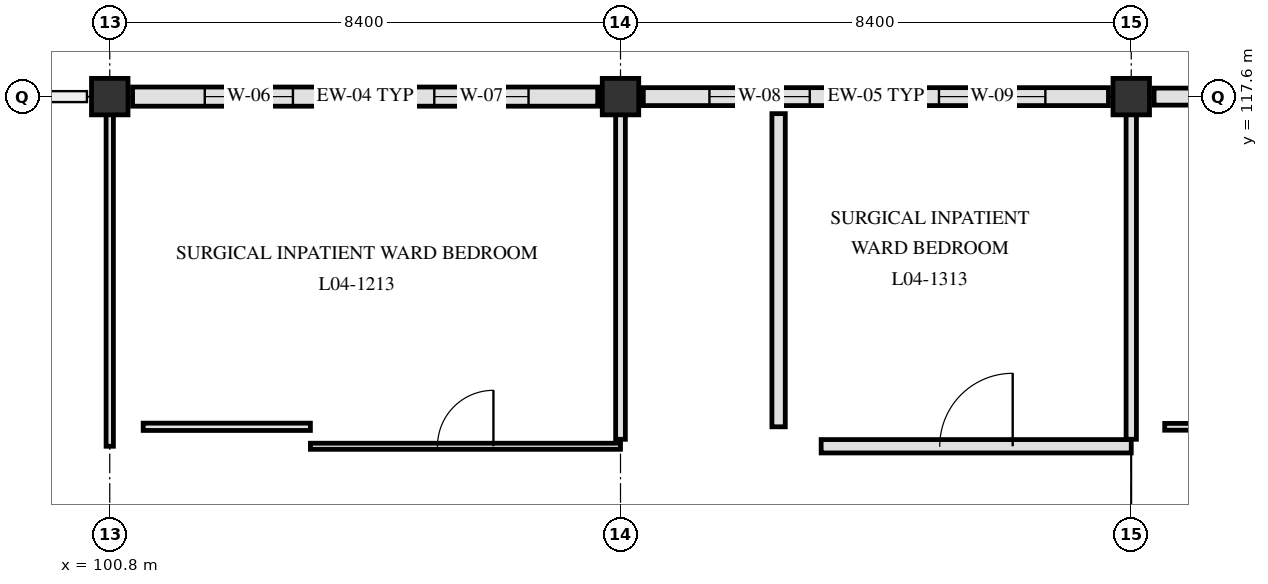
"""IFC4 building model, lengths in metres.
Left out: names, types, materials, properties, quantities, classifications, styles, units other than length and angle.
Written with IfcOpenShell. Run it as: python <this file> out.ifc"""

import sys

from ifc_helpers import new_model, si_unit, direction, frame, frame_2d, origin, origin_2d, place, context, subcontext, project, spatial, rectangle, extrude, element, fill, save


model = new_model("IFC4")
c1 = context("Model", 3, precision=1e-05, world=origin(), true_north=direction((0.0, 1.0)))
c2 = subcontext(c1, "Body", "Model", "MODEL_VIEW")
j1 = project(units=[si_unit("LENGTHUNIT", "METRE"), si_unit("PLANEANGLEUNIT", "RADIAN")], contexts=[c1])
p1 = place(None, origin())
s1 = spatial("IfcSite", under=j1, at=p1, CompositionType="ELEMENT")
p2 = place(p1, origin())
s2 = spatial("IfcBuilding", under=s1, at=p2, CompositionType="ELEMENT")
p3 = place(p2, frame((0.0, 0.0, 18.6)))
s3 = spatial("IfcBuildingStorey", under=s2, at=p3, CompositionType="ELEMENT", Elevation=18.6)
for number, where, z_axis, x_axis in (
    (1, (100.8, 117.6, 0.0), (0.0, 0.0, 1.0), (1.0, 0.0, 0.0)),
    (2, (109.2, 117.6, 0.0), (0.0, 0.0, 1.0), (1.0, 0.0, 0.0)),
    (3, (117.6, 117.6, 0.0), (0.0, 0.0, 1.0), (1.0, 0.0, 0.0)),
):
    element("IfcColumn", number, at=place(p3, frame(where, z_axis=z_axis, x_axis=x_axis)), inside=s3, PredefinedType="COLUMN", context=c2, shape_type="SweptSolid", body=[
        extrude(rectangle(XDim=0.6, YDim=0.6, at=origin_2d()), origin(), (0.0, 0.0, 1.0), 3.9),
    ])
p4 = place(p3, frame((101.175, 117.6, 0.0), z_axis=(0.0, 0.0, 1.0), x_axis=(1.0, 0.0, 0.0)))
e4 = element("IfcWall", 4, at=p4, inside=s3, PredefinedType="SOLIDWALL", context=c2, shape_type="SweptSolid", body=[
    extrude(rectangle(XDim=7.65, YDim=0.315, at=frame_2d((3.825, 0.0))), origin(), (0.0, 0.0, 1.0), 3.31),
])
p5 = place(p4, frame((1.188, 0.0, 0.85)))
e5 = element("IfcOpeningElement", 5, at=p5, cuts=e4, PredefinedType="OPENING", context=c2, shape_type="SweptSolid", body=[
    extrude(rectangle(XDim=1.45, YDim=1.3, at=frame_2d((0.725, 0.65))), frame((0.0, 0.167, 0.0), z_axis=(0.0, -1.0, 0.0), x_axis=(1.0, 0.0, 0.0)), (0.0, 0.0, 1.0), 0.335),
])
p6 = place(p4, frame((4.962, 0.0, 0.85)))
e6 = element("IfcOpeningElement", 6, at=p6, cuts=e4, PredefinedType="OPENING", context=c2, shape_type="SweptSolid", body=[
    extrude(rectangle(XDim=1.55, YDim=1.3, at=frame_2d((0.775, 0.65))), frame((0.0, 0.167, 0.0), z_axis=(0.0, -1.0, 0.0), x_axis=(1.0, 0.0, 0.0)), (0.0, 0.0, 1.0), 0.335),
])
p7 = place(p3, frame((109.575, 117.6, 0.0), z_axis=(0.0, 0.0, 1.0), x_axis=(1.0, 0.0, 0.0)))
e7 = element("IfcWall", 7, at=p7, inside=s3, PredefinedType="SOLIDWALL", context=c2, shape_type="SweptSolid", body=[
    extrude(rectangle(XDim=7.65, YDim=0.295, at=frame_2d((3.825, 0.0))), origin(), (0.0, 0.0, 1.0), 3.31),
])
p8 = place(p7, frame((1.087, 0.0, 0.85)))
e8 = element("IfcOpeningElement", 8, at=p8, cuts=e7, PredefinedType="OPENING", context=c2, shape_type="SweptSolid", body=[
    extrude(rectangle(XDim=1.65, YDim=1.3, at=frame_2d((0.825, 0.65))), frame((0.0, 0.157, 0.0), z_axis=(0.0, -1.0, 0.0), x_axis=(1.0, 0.0, 0.0)), (0.0, 0.0, 1.0), 0.315),
])
p9 = place(p7, frame((4.863, 0.0, 0.85)))
e9 = element("IfcOpeningElement", 9, at=p9, cuts=e7, PredefinedType="OPENING", context=c2, shape_type="SweptSolid", body=[
    extrude(rectangle(XDim=1.75, YDim=1.3, at=frame_2d((0.875, 0.65))), frame((0.0, 0.157, 0.0), z_axis=(0.0, -1.0, 0.0), x_axis=(1.0, 0.0, 0.0)), (0.0, 0.0, 1.0), 0.315),
])
p10 = place(p3, frame((117.975, 117.6, 0.0), z_axis=(0.0, 0.0, 1.0), x_axis=(1.0, 0.0, 0.0)))
e10 = element("IfcWall", 10, at=p10, inside=s3, PredefinedType="SOLIDWALL", context=c2, shape_type="SweptSolid", body=[
    extrude(rectangle(XDim=7.65, YDim=0.28, at=frame_2d((3.825, 0.0))), origin(), (0.0, 0.0, 1.0), 3.31),
])
p11 = place(p10, frame((0.988, 0.0, 0.85)))
e11 = element("IfcOpeningElement", 11, at=p11, cuts=e10, PredefinedType="OPENING", context=c2, shape_type="SweptSolid", body=[
    extrude(rectangle(XDim=1.85, YDim=1.3, at=frame_2d((0.925, 0.65))), frame((0.0, 0.15, 0.0), z_axis=(0.0, -1.0, 0.0), x_axis=(1.0, 0.0, 0.0)), (0.0, 0.0, 1.0), 0.3),
])
p12 = place(p10, frame((5.238, 0.0, 0.85)))
e12 = element("IfcOpeningElement", 12, at=p12, cuts=e10, PredefinedType="OPENING", context=c2, shape_type="SweptSolid", body=[
    extrude(rectangle(XDim=1.0, YDim=1.42, at=frame_2d((0.5, 0.71))), frame((0.0, 0.15, 0.0), z_axis=(0.0, -1.0, 0.0), x_axis=(1.0, 0.0, 0.0)), (0.0, 0.0, 1.0), 0.3),
])
p13 = place(p3, frame((104.1, 111.85, 0.0), z_axis=(0.0, 0.0, 1.0), x_axis=(1.0, 0.0, 0.0)))
e13 = element("IfcWall", 13, at=p13, inside=s3, PredefinedType="PARTITIONING", context=c2, shape_type="SweptSolid", body=[
    extrude(rectangle(XDim=5.1, YDim=0.1, at=frame_2d((2.55, 0.0))), origin(), (0.0, 0.0, 1.0), 3.26),
])
p14 = place(p13, frame((2.09, 0.0, 0.0)))
e14 = element("IfcOpeningElement", 14, at=p14, cuts=e13, PredefinedType="OPENING", context=c2, shape_type="SweptSolid", body=[
    extrude(rectangle(XDim=0.92, YDim=2.08, at=frame_2d((0.46, 1.04))), frame((0.0, 0.06, 0.0), z_axis=(0.0, -1.0, 0.0), x_axis=(1.0, 0.0, 0.0)), (0.0, 0.0, 1.0), 0.12),
])
p15 = place(p3, frame((112.5, 111.85, 0.0), z_axis=(0.0, 0.0, 1.0), x_axis=(1.0, 0.0, 0.0)))
e15 = element("IfcWall", 15, at=p15, inside=s3, PredefinedType="PARTITIONING", context=c2, shape_type="SweptSolid", body=[
    extrude(rectangle(XDim=5.1, YDim=0.22, at=frame_2d((2.55, 0.0))), origin(), (0.0, 0.0, 1.0), 3.26),
])
p16 = place(p15, frame((1.95, 0.0, 0.0)))
e16 = element("IfcOpeningElement", 16, at=p16, cuts=e15, PredefinedType="OPENING", context=c2, shape_type="SweptSolid", body=[
    extrude(rectangle(XDim=1.2, YDim=2.15, at=frame_2d((0.6, 1.075))), frame((0.0, 0.12, 0.0), z_axis=(0.0, -1.0, 0.0), x_axis=(1.0, 0.0, 0.0)), (0.0, 0.0, 1.0), 0.24),
])
p17 = place(p3, frame((101.35, 112.17, 0.0), z_axis=(0.0, 0.0, 1.0), x_axis=(1.0, 0.0, 0.0)))
e17 = element("IfcWall", 17, at=p17, inside=s3, PredefinedType="PARTITIONING", context=c2, shape_type="SweptSolid", body=[
    extrude(rectangle(XDim=2.75, YDim=0.12, at=frame_2d((1.375, 0.0))), origin(), (0.0, 0.0, 1.0), 3.61),
])
p18 = place(p3, frame((118.15, 112.17, 0.0), z_axis=(0.0, 0.0, 1.0), x_axis=(1.0, 0.0, 0.0)))
e18 = element("IfcWall", 18, at=p18, inside=s3, PredefinedType="PARTITIONING", context=c2, shape_type="SweptSolid", body=[
    extrude(rectangle(XDim=2.75, YDim=0.112, at=frame_2d((1.375, 0.0))), origin(), (0.0, 0.0, 1.0), 3.61),
])
p19 = place(p3, frame((100.8, 111.85, 0.0), z_axis=(0.0, 0.0, 1.0), x_axis=(0.0, 1.0, 0.0)))
e19 = element("IfcWall", 19, at=p19, inside=s3, PredefinedType="PARTITIONING", context=c2, shape_type="SweptSolid", body=[
    extrude(rectangle(XDim=5.455, YDim=0.12, at=frame_2d((2.728, 0.0))), origin(), (0.0, 0.0, 1.0), 3.26),
])
p20 = place(p3, frame((109.2, 111.965, 0.0), z_axis=(0.0, 0.0, 1.0), x_axis=(0.0, 1.0, 0.0)))
e20 = element("IfcWall", 20, at=p20, inside=s3, PredefinedType="PARTITIONING", context=c2, shape_type="SweptSolid", body=[
    extrude(rectangle(XDim=5.34, YDim=0.16, at=frame_2d((2.67, 0.0))), origin(), (0.0, 0.0, 1.0), 3.26),
])
p21 = place(p3, frame((111.8, 112.17, 0.0), z_axis=(0.0, 0.0, 1.0), x_axis=(0.0, 1.0, 0.0)))
e21 = element("IfcWall", 21, at=p21, inside=s3, PredefinedType="PARTITIONING", context=c2, shape_type="SweptSolid", body=[
    extrude(rectangle(XDim=5.15, YDim=0.22, at=frame_2d((2.575, 0.0))), origin(), (0.0, 0.0, 1.0), 3.31),
])
p22 = place(p3, frame((117.6, 111.965, 0.0), z_axis=(0.0, 0.0, 1.0), x_axis=(0.0, 1.0, 0.0)))
e22 = element("IfcWall", 22, at=p22, inside=s3, PredefinedType="PARTITIONING", context=c2, shape_type="SweptSolid", body=[
    extrude(rectangle(XDim=5.34, YDim=0.17, at=frame_2d((2.67, 0.0))), origin(), (0.0, 0.0, 1.0), 3.26),
])
p23 = place(p5, origin())
e23 = element("IfcWindow", 23, at=p23, inside=s3, PartitioningType="SINGLE_PANEL", PredefinedType="WINDOW", context=c2, shape_type="SweptSolid", body=[
    extrude(rectangle(XDim=1.45, YDim=1.3, at=frame_2d((0.725, 0.65))), frame((0.0, 0.03, 0.0), z_axis=(0.0, -1.0, 0.0), x_axis=(1.0, 0.0, 0.0)), (0.0, 0.0, 1.0), 0.06),
])
fill(e5, e23)
p24 = place(p6, origin())
e24 = element("IfcWindow", 24, at=p24, inside=s3, PartitioningType="SINGLE_PANEL", PredefinedType="WINDOW", context=c2, shape_type="SweptSolid", body=[
    extrude(rectangle(XDim=1.55, YDim=1.3, at=frame_2d((0.775, 0.65))), frame((0.0, 0.03, 0.0), z_axis=(0.0, -1.0, 0.0), x_axis=(1.0, 0.0, 0.0)), (0.0, 0.0, 1.0), 0.06),
])
fill(e6, e24)
p25 = place(p8, origin())
e25 = element("IfcWindow", 25, at=p25, inside=s3, PartitioningType="SINGLE_PANEL", PredefinedType="WINDOW", context=c2, shape_type="SweptSolid", body=[
    extrude(rectangle(XDim=1.65, YDim=1.3, at=frame_2d((0.825, 0.65))), frame((0.0, 0.03, 0.0), z_axis=(0.0, -1.0, 0.0), x_axis=(1.0, 0.0, 0.0)), (0.0, 0.0, 1.0), 0.06),
])
fill(e8, e25)
p26 = place(p9, origin())
e26 = element("IfcWindow", 26, at=p26, inside=s3, PartitioningType="SINGLE_PANEL", PredefinedType="WINDOW", context=c2, shape_type="SweptSolid", body=[
    extrude(rectangle(XDim=1.75, YDim=1.3, at=frame_2d((0.875, 0.65))), frame((0.0, 0.03, 0.0), z_axis=(0.0, -1.0, 0.0), x_axis=(1.0, 0.0, 0.0)), (0.0, 0.0, 1.0), 0.06),
])
fill(e9, e26)
p27 = place(p14, origin())
e27 = element("IfcDoor", 27, at=p27, inside=s3, OperationType="SINGLE_SWING_RIGHT", PredefinedType="DOOR", context=c2, shape_type="SweptSolid", body=[
    extrude(rectangle(XDim=0.92, YDim=2.08, at=frame_2d((0.46, 1.04))), frame((0.0, 0.025, 0.0), z_axis=(0.0, -1.0, 0.0), x_axis=(1.0, 0.0, 0.0)), (0.0, 0.0, 1.0), 0.05),
])
fill(e14, e27)
p28 = place(p16, origin())
e28 = element("IfcDoor", 28, at=p28, inside=s3, OperationType="SINGLE_SWING_RIGHT", PredefinedType="DOOR", context=c2, shape_type="SweptSolid", body=[
    extrude(rectangle(XDim=1.2, YDim=2.15, at=frame_2d((0.6, 1.075))), frame((0.0, 0.025, 0.0), z_axis=(0.0, -1.0, 0.0), x_axis=(1.0, 0.0, 0.0)), (0.0, 0.0, 1.0), 0.05),
])
fill(e16, e28)
save(model, sys.argv[1])
